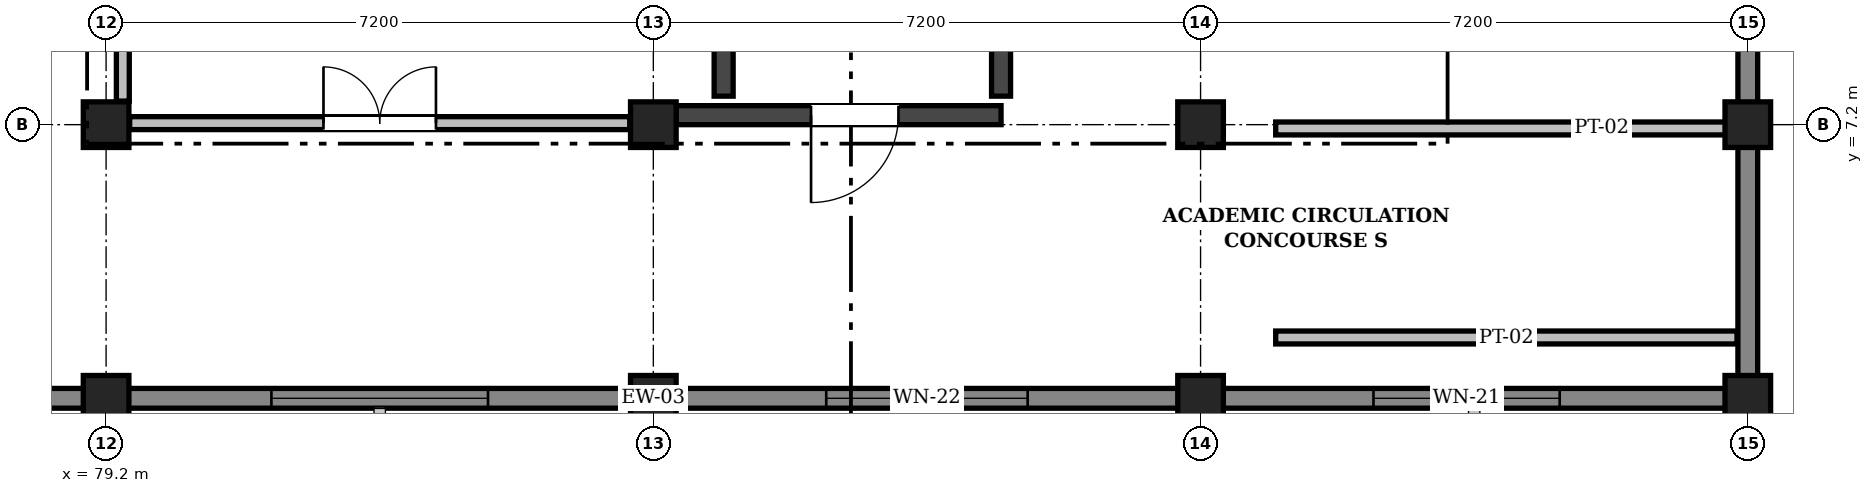
"""IFC4 building model, lengths in metres.
Left out: names, types, materials, properties, quantities, classifications, styles, units other than length and angle.
Written with IfcOpenShell. Run it as: python <this file> out.ifc"""

import sys

from ifc_helpers import new_model, si_unit, direction, frame, frame_2d, origin, origin_2d, place, context, subcontext, project, spatial, rectangle, extrude, element, fill, save


model = new_model("IFC4")
c1 = context("Model", 3, precision=1e-05, world=origin(), true_north=direction((0.0, 1.0)))
c2 = subcontext(c1, "Body", "Model", "MODEL_VIEW")
j1 = project(units=[si_unit("LENGTHUNIT", "METRE"), si_unit("PLANEANGLEUNIT", "RADIAN")], contexts=[c1])
p1 = place(None, origin())
s1 = spatial("IfcSite", under=j1, at=p1, CompositionType="ELEMENT")
p2 = place(p1, origin())
s2 = spatial("IfcBuilding", under=s1, at=p2, CompositionType="ELEMENT")
p3 = place(p2, frame((0.0, 0.0, 27.9)))
s3 = spatial("IfcBuildingStorey", under=s2, at=p3, CompositionType="ELEMENT", Elevation=27.9)
for number, where, z_axis, x_axis in (
    (1, (79.2, 3.6, 0.0), (0.0, 0.0, 1.0), (1.0, 0.0, 0.0)),
    (2, (79.2, 7.2, 0.0), (0.0, 0.0, 1.0), (1.0, 0.0, 0.0)),
    (3, (86.4, 3.6, 0.0), (0.0, 0.0, 1.0), (1.0, 0.0, 0.0)),
    (4, (86.4, 7.2, 0.0), (0.0, 0.0, 1.0), (1.0, 0.0, 0.0)),
    (5, (93.6, 3.6, 0.0), (0.0, 0.0, 1.0), (1.0, 0.0, 0.0)),
    (6, (93.6, 7.2, 0.0), (0.0, 0.0, 1.0), (1.0, 0.0, 0.0)),
    (7, (100.8, 3.6, 0.0), (0.0, 0.0, 1.0), (1.0, 0.0, 0.0)),
    (8, (100.8, 7.2, 0.0), (0.0, 0.0, 1.0), (1.0, 0.0, 0.0)),
):
    element("IfcColumn", number, at=place(p3, frame(where, z_axis=z_axis, x_axis=x_axis)), inside=s3, PredefinedType="COLUMN", context=c2, shape_type="SweptSolid", body=[
        extrude(rectangle(XDim=0.6, YDim=0.6, at=origin_2d()), origin(), (0.0, 0.0, 1.0), 4.5),
    ])
p4 = place(p3, frame((100.95, 3.6, 0.0), z_axis=(0.0, 0.0, 1.0), x_axis=(-1.0, 0.0, 0.0)))
e9 = element("IfcWall", 9, at=p4, inside=s3, PredefinedType="SOLIDWALL", context=c2, shape_type="SweptSolid", body=[
    extrude(rectangle(XDim=7.35, YDim=0.26, at=frame_2d((3.675, 0.0))), origin(), (0.0, 0.0, 1.0), 4.22),
])
p5 = place(p4, frame((2.625, 0.0, 0.95)))
e10 = element("IfcOpeningElement", 10, at=p5, cuts=e9, PredefinedType="OPENING", context=c2, shape_type="SweptSolid", body=[
    extrude(rectangle(XDim=2.45, YDim=1.55, at=frame_2d((1.225, 0.775))), frame((0.0, 0.142, 0.0), z_axis=(0.0, -1.0, 0.0), x_axis=(1.0, 0.0, 0.0)), (0.0, 0.0, 1.0), 0.284),
])
p6 = place(p3, frame((93.6, 3.6, 0.0), z_axis=(0.0, 0.0, 1.0), x_axis=(-1.0, 0.0, 0.0)))
e11 = element("IfcWall", 11, at=p6, inside=s3, PredefinedType="SOLIDWALL", context=c2, shape_type="SweptSolid", body=[
    extrude(rectangle(XDim=7.2, YDim=0.26, at=frame_2d((3.6, 0.0))), origin(), (0.0, 0.0, 1.0), 4.22),
])
p7 = place(p6, frame((2.275, 0.0, 0.95)))
e12 = element("IfcOpeningElement", 12, at=p7, cuts=e11, PredefinedType="OPENING", context=c2, shape_type="SweptSolid", body=[
    extrude(rectangle(XDim=2.65, YDim=1.55, at=frame_2d((1.325, 0.775))), frame((0.0, 0.142, 0.0), z_axis=(0.0, -1.0, 0.0), x_axis=(1.0, 0.0, 0.0)), (0.0, 0.0, 1.0), 0.284),
])
p8 = place(p3, frame((86.4, 3.6, 0.0), z_axis=(0.0, 0.0, 1.0), x_axis=(-1.0, 0.0, 0.0)))
e13 = element("IfcWall", 13, at=p8, inside=s3, PredefinedType="SOLIDWALL", context=c2, shape_type="SweptSolid", body=[
    extrude(rectangle(XDim=7.2, YDim=0.26, at=frame_2d((3.6, 0.0))), origin(), (0.0, 0.0, 1.0), 4.22),
])
p9 = place(p8, frame((2.175, 0.0, 0.95)))
e14 = element("IfcOpeningElement", 14, at=p9, cuts=e13, PredefinedType="OPENING", context=c2, shape_type="SweptSolid", body=[
    extrude(rectangle(XDim=2.85, YDim=1.55, at=frame_2d((1.425, 0.775))), frame((0.0, 0.142, 0.0), z_axis=(0.0, -1.0, 0.0), x_axis=(1.0, 0.0, 0.0)), (0.0, 0.0, 1.0), 0.284),
])
p10 = place(p3, frame((79.2, 3.6, 0.0), z_axis=(0.0, 0.0, 1.0), x_axis=(-1.0, 0.0, 0.0)))
e15 = element("IfcWall", 15, at=p10, inside=s3, PredefinedType="SOLIDWALL", context=c2, shape_type="SweptSolid", body=[
    extrude(rectangle(XDim=7.35, YDim=0.26, at=frame_2d((3.675, 0.0))), origin(), (0.0, 0.0, 1.0), 4.22),
])
p11 = place(p10, frame((2.125, 0.0, 0.95)))
e16 = element("IfcOpeningElement", 16, at=p11, cuts=e15, PredefinedType="OPENING", context=c2, shape_type="SweptSolid", body=[
    extrude(rectangle(XDim=3.1, YDim=1.55, at=frame_2d((1.55, 0.775))), frame((0.0, 0.142, 0.0), z_axis=(0.0, -1.0, 0.0), x_axis=(1.0, 0.0, 0.0)), (0.0, 0.0, 1.0), 0.284),
])
p12 = place(p3, frame((100.8, 14.4, 0.0), z_axis=(0.0, 0.0, 1.0), x_axis=(0.0, -1.0, 0.0)))
e17 = element("IfcWall", 17, at=p12, inside=s3, PredefinedType="SOLIDWALL", context=c2, shape_type="SweptSolid", body=[
    extrude(rectangle(XDim=7.2, YDim=0.26, at=frame_2d((3.6, 0.0))), origin(), (0.0, 0.0, 1.0), 4.22),
])
p13 = place(p12, frame((2.725, 0.0, 0.95)))
e18 = element("IfcOpeningElement", 18, at=p13, cuts=e17, PredefinedType="OPENING", context=c2, shape_type="SweptSolid", body=[
    extrude(rectangle(XDim=1.75, YDim=1.3, at=frame_2d((0.875, 0.65))), frame((0.0, 0.142, 0.0), z_axis=(0.0, -1.0, 0.0), x_axis=(1.0, 0.0, 0.0)), (0.0, 0.0, 1.0), 0.284),
])
p14 = place(p3, frame((100.8, 7.2, 0.0), z_axis=(0.0, 0.0, 1.0), x_axis=(0.0, -1.0, 0.0)))
e19 = element("IfcWall", 19, at=p14, inside=s3, PredefinedType="SOLIDWALL", context=c2, shape_type="SweptSolid", body=[
    extrude(rectangle(XDim=3.448, YDim=0.26, at=frame_2d((1.724, 0.0))), origin(), (0.0, 0.0, 1.0), 4.22),
])
p15 = place(p3, frame((86.7, 7.325, 0.0), z_axis=(0.0, 0.0, 1.0), x_axis=(1.0, 0.0, 0.0)))
e20 = element("IfcWall", 20, at=p15, inside=s3, PredefinedType="SHEAR", context=c2, shape_type="SweptSolid", body=[
    extrude(rectangle(XDim=4.275, YDim=0.25, at=frame_2d((2.138, 0.0))), origin(), (0.0, 0.0, 1.0), 4.25),
])
p16 = place(p15, frame((1.775, 0.0, 0.0)))
e21 = element("IfcOpeningElement", 21, at=p16, cuts=e20, PredefinedType="OPENING", context=c2, shape_type="SweptSolid", body=[
    extrude(rectangle(XDim=1.15, YDim=2.15, at=frame_2d((0.575, 1.075))), frame((0.0, 0.137, 0.0), z_axis=(0.0, -1.0, 0.0), x_axis=(1.0, 0.0, 0.0)), (0.0, 0.0, 1.0), 0.274),
])
p17 = place(p3, frame((87.325, 7.575, 0.0), z_axis=(0.0, 0.0, 1.0), x_axis=(0.0, 1.0, 0.0)))
e22 = element("IfcWall", 22, at=p17, inside=s3, PredefinedType="SHEAR", context=c2, shape_type="SweptSolid", body=[
    extrude(rectangle(XDim=2.77, YDim=0.25, at=frame_2d((1.385, 0.0))), origin(), (0.0, 0.0, 1.0), 4.25),
])
p18 = place(p3, frame((90.975, 7.575, 0.0), z_axis=(0.0, 0.0, 1.0), x_axis=(0.0, 1.0, 0.0)))
e23 = element("IfcWall", 23, at=p18, inside=s3, PredefinedType="SHEAR", context=c2, shape_type="SweptSolid", body=[
    extrude(rectangle(XDim=3.225, YDim=0.25, at=frame_2d((1.613, 0.0))), origin(), (0.0, 0.0, 1.0), 4.25),
])
p19 = place(p3, frame((79.42, 7.51, 0.0), z_axis=(0.0, 0.0, 1.0), x_axis=(0.0, 1.0, 0.0)))
e24 = element("IfcWall", 24, at=p19, inside=s3, PredefinedType="PARTITIONING", context=c2, shape_type="SweptSolid", body=[
    extrude(rectangle(XDim=2.54, YDim=0.17, at=frame_2d((1.27, 0.0))), origin(), (0.0, 0.0, 1.0), 3.78),
])
p20 = place(p3, frame((79.51, 7.22, 0.0), z_axis=(0.0, 0.0, 1.0), x_axis=(1.0, 0.0, 0.0)))
e25 = element("IfcWall", 25, at=p20, inside=s3, PredefinedType="PARTITIONING", context=c2, shape_type="SweptSolid", body=[
    extrude(rectangle(XDim=6.58, YDim=0.17, at=frame_2d((3.29, 0.0))), origin(), (0.0, 0.0, 1.0), 3.8),
])
p21 = place(p20, frame((2.55, 0.0, 0.0)))
e26 = element("IfcOpeningElement", 26, at=p21, cuts=e25, PredefinedType="OPENING", context=c2, shape_type="SweptSolid", body=[
    extrude(rectangle(XDim=1.48, YDim=2.26, at=frame_2d((0.74, 1.13))), frame((0.0, 0.097, 0.0), z_axis=(0.0, -1.0, 0.0), x_axis=(1.0, 0.0, 0.0)), (0.0, 0.0, 1.0), 0.194),
])
p22 = place(p3, frame((94.588, 4.4, 0.0), z_axis=(0.0, 0.0, 1.0), x_axis=(1.0, 0.0, 0.0)))
e27 = element("IfcWall", 27, at=p22, inside=s3, PredefinedType="PARTITIONING", context=c2, shape_type="SweptSolid", body=[
    extrude(rectangle(XDim=6.07, YDim=0.17, at=frame_2d((3.035, 0.0))), origin(), (0.0, 0.0, 1.0), 4.16),
])
p23 = place(p3, frame((94.588, 7.15, 0.0), z_axis=(0.0, 0.0, 1.0), x_axis=(1.0, 0.0, 0.0)))
e28 = element("IfcWall", 28, at=p23, inside=s3, PredefinedType="PARTITIONING", context=c2, shape_type="SweptSolid", body=[
    extrude(rectangle(XDim=6.07, YDim=0.17, at=frame_2d((3.035, 0.0))), origin(), (0.0, 0.0, 1.0), 3.8),
])
p24 = place(p5, origin())
e29 = element("IfcWindow", 29, at=p24, inside=s3, PartitioningType="SINGLE_PANEL", PredefinedType="WINDOW", context=c2, shape_type="SweptSolid", body=[
    extrude(rectangle(XDim=2.45, YDim=1.55, at=frame_2d((1.225, 0.775))), frame((0.0, 0.03, 0.0), z_axis=(0.0, -1.0, 0.0), x_axis=(1.0, 0.0, 0.0)), (0.0, 0.0, 1.0), 0.06),
])
fill(e10, e29)
p25 = place(p7, origin())
e30 = element("IfcWindow", 30, at=p25, inside=s3, PartitioningType="SINGLE_PANEL", PredefinedType="WINDOW", context=c2, shape_type="SweptSolid", body=[
    extrude(rectangle(XDim=2.65, YDim=1.55, at=frame_2d((1.325, 0.775))), frame((0.0, 0.03, 0.0), z_axis=(0.0, -1.0, 0.0), x_axis=(1.0, 0.0, 0.0)), (0.0, 0.0, 1.0), 0.06),
])
fill(e12, e30)
p26 = place(p9, origin())
e31 = element("IfcWindow", 31, at=p26, inside=s3, PartitioningType="SINGLE_PANEL", PredefinedType="WINDOW", context=c2, shape_type="SweptSolid", body=[
    extrude(rectangle(XDim=2.85, YDim=1.55, at=frame_2d((1.425, 0.775))), frame((0.0, 0.03, 0.0), z_axis=(0.0, -1.0, 0.0), x_axis=(1.0, 0.0, 0.0)), (0.0, 0.0, 1.0), 0.06),
])
fill(e14, e31)
p27 = place(p16, frame((1.15, 0.0, 0.0), z_axis=(0.0, 0.0, 1.0), x_axis=(-1.0, 0.0, 0.0)))
e32 = element("IfcDoor", 32, at=p27, inside=s3, OperationType="SINGLE_SWING_RIGHT", PredefinedType="DOOR", context=c2, shape_type="SweptSolid", body=[
    extrude(rectangle(XDim=1.15, YDim=2.15, at=frame_2d((0.575, 1.075))), frame((0.0, 0.025, 0.0), z_axis=(0.0, -1.0, 0.0), x_axis=(1.0, 0.0, 0.0)), (0.0, 0.0, 1.0), 0.05),
])
fill(e21, e32)
p28 = place(p21, origin())
e33 = element("IfcDoor", 33, at=p28, inside=s3, OperationType="DOUBLE_DOOR_SINGLE_SWING", PredefinedType="DOOR", context=c2, shape_type="SweptSolid", body=[
    extrude(rectangle(XDim=1.48, YDim=2.26, at=frame_2d((0.74, 1.13))), frame((0.0, 0.025, 0.0), z_axis=(0.0, -1.0, 0.0), x_axis=(1.0, 0.0, 0.0)), (0.0, 0.0, 1.0), 0.05),
])
fill(e26, e33)
save(model, sys.argv[1])
